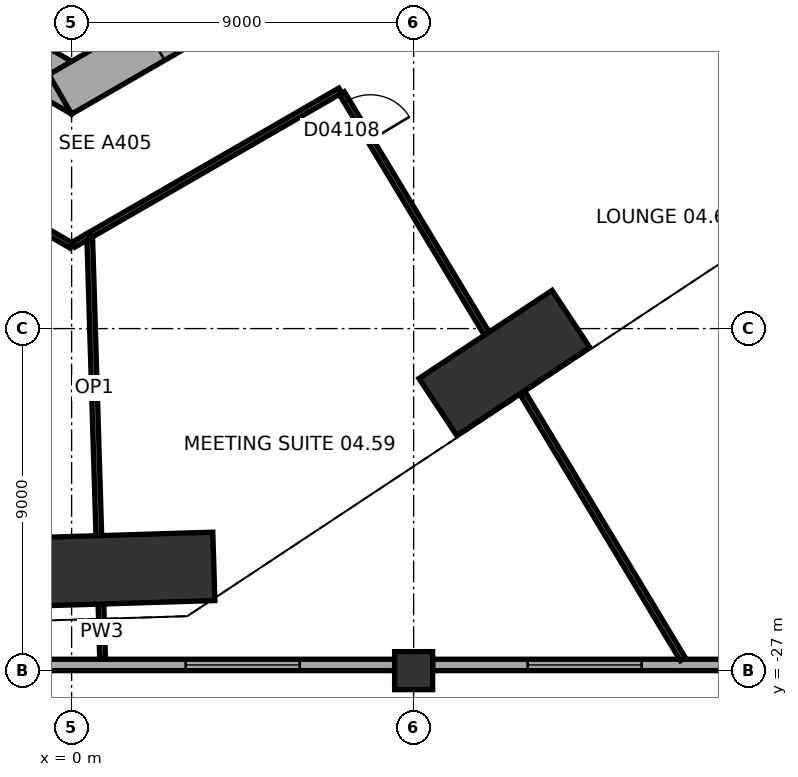
"""IFC4 building model, lengths in metres.
Left out: names, types, materials, properties, quantities, classifications, styles, units other than length and angle.
Written with IfcOpenShell. Run it as: python <this file> out.ifc"""

import sys

from ifc_helpers import new_model, si_unit, direction, frame, frame_2d, origin, origin_2d, place, context, subcontext, project, spatial, rectangle, extrude, element, fill, save


model = new_model("IFC4")
c1 = context("Model", 3, precision=1e-05, world=origin(), true_north=direction((0.0, 1.0)))
c2 = subcontext(c1, "Body", "Model", "MODEL_VIEW")
j1 = project(units=[si_unit("LENGTHUNIT", "METRE"), si_unit("PLANEANGLEUNIT", "RADIAN")], contexts=[c1])
p1 = place(None, origin())
s1 = spatial("IfcSite", under=j1, at=p1, CompositionType="ELEMENT")
p2 = place(p1, origin())
s2 = spatial("IfcBuilding", under=s1, at=p2, CompositionType="ELEMENT")
p3 = place(p2, frame((0.0, 0.0, 29.0)))
s3 = spatial("IfcBuildingStorey", under=s2, at=p3, CompositionType="ELEMENT", Elevation=29.0)
p4 = place(p3, frame((0.744, -24.348, 0.0), z_axis=(0.0, 0.0, 1.0), x_axis=(0.999533484231, 0.03054200224, 0.0)))
e1 = element("IfcColumn", 1, at=p4, inside=s3, PredefinedType="COLUMN", context=c2, shape_type="SweptSolid", body=[
    extrude(rectangle(XDim=6.0, YDim=1.8, at=origin_2d()), origin(), (0.0, 0.0, 1.0), 5.5),
])
p5 = place(p3, frame((11.389, -18.905, 0.0), z_axis=(0.0, 0.0, 1.0), x_axis=(0.833880042151, 0.551945717714, 0.0)))
e2 = element("IfcColumn", 2, at=p5, inside=s3, PredefinedType="COLUMN", context=c2, shape_type="SweptSolid", body=[
    extrude(rectangle(XDim=4.2, YDim=1.8, at=origin_2d()), origin(), (0.0, 0.0, 1.0), 5.5),
])
p6 = place(p3, frame((9.0, -27.0, 0.0), z_axis=(0.0, 0.0, 1.0), x_axis=(1.0, 0.0, 0.0)))
e3 = element("IfcColumn", 3, at=p6, inside=s3, PredefinedType="COLUMN", context=c2, shape_type="SweptSolid", body=[
    extrude(rectangle(XDim=1.0, YDim=1.0, at=origin_2d()), origin(), (0.0, 0.0, 1.0), 5.5),
])
p7 = place(p3, frame((-10.4, -5.658, 0.0), z_axis=(0.0, 0.0, 1.0), x_axis=(0.866021384402, -0.500006961711, 0.0)))
e4 = element("IfcWall", 4, at=p7, inside=s3, PredefinedType="SHEAR", context=c2, shape_type="SweptSolid", body=[
    extrude(rectangle(XDim=12.355, YDim=1.2, at=frame_2d((6.178, 0.0))), origin(), (0.0, 0.0, 1.0), 5.5),
])
p8 = place(p7, frame((6.378, 0.0, 0.0)))
e5 = element("IfcOpeningElement", 5, at=p8, cuts=e4, PredefinedType="OPENING", context=c2, shape_type="SweptSolid", body=[
    extrude(rectangle(XDim=1.5, YDim=2.1, at=frame_2d((0.75, 1.05))), frame((0.0, 0.61, 0.0), z_axis=(0.0, -1.0, 0.0), x_axis=(1.0, 0.0, 0.0)), (0.0, 0.0, 1.0), 1.22),
])
p9 = place(p7, frame((3.228, 0.0, 0.0)))
e6 = element("IfcOpeningElement", 6, at=p9, cuts=e4, PredefinedType="OPENING", context=c2, shape_type="SweptSolid", body=[
    extrude(rectangle(XDim=0.9, YDim=2.1, at=frame_2d((0.45, 1.05))), frame((0.0, 0.61, 0.0), z_axis=(0.0, -1.0, 0.0), x_axis=(1.0, 0.0, 0.0)), (0.0, 0.0, 1.0), 1.22),
])
p10 = place(p3, frame((-0.3, -11.836, 0.0), z_axis=(0.0, 0.0, 1.0), x_axis=(0.866021384402, 0.500006961711, 0.0)))
e7 = element("IfcWall", 7, at=p10, inside=s3, PredefinedType="SHEAR", context=c2, shape_type="SweptSolid", body=[
    extrude(rectangle(XDim=12.355, YDim=1.2, at=frame_2d((6.178, 0.0))), origin(), (0.0, 0.0, 1.0), 5.5),
])
p11 = place(p10, frame((2.828, 0.0, 0.0)))
e8 = element("IfcOpeningElement", 8, at=p11, cuts=e7, PredefinedType="OPENING", context=c2, shape_type="SweptSolid", body=[
    extrude(rectangle(XDim=0.9, YDim=2.1, at=frame_2d((0.45, 1.05))), frame((0.0, 0.61, 0.0), z_axis=(0.0, -1.0, 0.0), x_axis=(1.0, 0.0, 0.0)), (0.0, 0.0, 1.0), 1.22),
])
p12 = place(p10, frame((5.428, 0.0, 0.0)))
e9 = element("IfcOpeningElement", 9, at=p12, cuts=e7, PredefinedType="OPENING", context=c2, shape_type="SweptSolid", body=[
    extrude(rectangle(XDim=0.9, YDim=2.1, at=frame_2d((0.45, 1.05))), frame((0.0, 0.61, 0.0), z_axis=(0.0, -1.0, 0.0), x_axis=(1.0, 0.0, 0.0)), (0.0, 0.0, 1.0), 1.22),
])
p13 = place(p10, frame((7.928, 0.0, 0.0)))
e10 = element("IfcOpeningElement", 10, at=p13, cuts=e7, PredefinedType="OPENING", context=c2, shape_type="SweptSolid", body=[
    extrude(rectangle(XDim=1.1, YDim=2.1, at=frame_2d((0.55, 1.05))), frame((0.0, 0.61, 0.0), z_axis=(0.0, -1.0, 0.0), x_axis=(1.0, 0.0, 0.0)), (0.0, 0.0, 1.0), 1.22),
])
p14 = place(p3, frame((-8.5, -26.85, 0.0), z_axis=(0.0, 0.0, 1.0), x_axis=(1.0, 0.0, 0.0)))
e11 = element("IfcWall", 11, at=p14, inside=s3, PredefinedType="STANDARD", context=c2, shape_type="SweptSolid", body=[
    extrude(rectangle(XDim=17.0, YDim=0.3, at=frame_2d((8.5, 0.0))), origin(), (0.0, 0.0, 1.0), 3.95),
])
p15 = place(p14, frame((2.5, 0.0, 1.0)))
e12 = element("IfcOpeningElement", 12, at=p15, cuts=e11, PredefinedType="OPENING", context=c2, shape_type="SweptSolid", body=[
    extrude(rectangle(XDim=3.0, YDim=2.6, at=frame_2d((1.5, 1.3))), frame((0.0, 0.16, 0.0), z_axis=(0.0, -1.0, 0.0), x_axis=(1.0, 0.0, 0.0)), (0.0, 0.0, 1.0), 0.32),
])
p16 = place(p14, frame((11.5, 0.0, 1.0)))
e13 = element("IfcOpeningElement", 13, at=p16, cuts=e11, PredefinedType="OPENING", context=c2, shape_type="SweptSolid", body=[
    extrude(rectangle(XDim=3.0, YDim=2.6, at=frame_2d((1.5, 1.3))), frame((0.0, 0.16, 0.0), z_axis=(0.0, -1.0, 0.0), x_axis=(1.0, 0.0, 0.0)), (0.0, 0.0, 1.0), 0.32),
])
p17 = place(p3, frame((9.5, -26.85, 0.0), z_axis=(0.0, 0.0, 1.0), x_axis=(1.0, 0.0, 0.0)))
e14 = element("IfcWall", 14, at=p17, inside=s3, PredefinedType="STANDARD", context=c2, shape_type="SweptSolid", body=[
    extrude(rectangle(XDim=17.0, YDim=0.3, at=frame_2d((8.5, 0.0))), origin(), (0.0, 0.0, 1.0), 3.95),
])
p18 = place(p17, frame((2.5, 0.0, 1.0)))
e15 = element("IfcOpeningElement", 15, at=p18, cuts=e14, PredefinedType="OPENING", context=c2, shape_type="SweptSolid", body=[
    extrude(rectangle(XDim=3.0, YDim=2.6, at=frame_2d((1.5, 1.3))), frame((0.0, 0.16, 0.0), z_axis=(0.0, -1.0, 0.0), x_axis=(1.0, 0.0, 0.0)), (0.0, 0.0, 1.0), 0.32),
])
p19 = place(p17, frame((11.5, 0.0, 1.0)))
e16 = element("IfcOpeningElement", 16, at=p19, cuts=e14, PredefinedType="OPENING", context=c2, shape_type="SweptSolid", body=[
    extrude(rectangle(XDim=3.0, YDim=2.6, at=frame_2d((1.5, 1.3))), frame((0.0, 0.16, 0.0), z_axis=(0.0, -1.0, 0.0), x_axis=(1.0, 0.0, 0.0)), (0.0, 0.0, 1.0), 0.32),
])
p20 = place(p3, frame((0.771, -25.248, 0.0), z_axis=(0.0, 0.0, 1.0), x_axis=(0.030584206332, -0.99953219374, 0.0)))
e17 = element("IfcWall", 17, at=p20, inside=s3, PredefinedType="PARTITIONING", context=c2, shape_type="SweptSolid", body=[
    extrude(rectangle(XDim=1.453, YDim=0.15, at=frame_2d((0.727, 0.0))), origin(), (0.0, 0.0, 1.0), 5.15),
])
p21 = place(p3, frame((11.879, -19.719, 0.0), z_axis=(0.0, 0.0, 1.0), x_axis=(0.516054476578, -0.856555764212, 0.0)))
e18 = element("IfcWall", 18, at=p21, inside=s3, PredefinedType="PARTITIONING", context=c2, shape_type="SweptSolid", body=[
    extrude(rectangle(XDim=8.149, YDim=0.15, at=frame_2d((4.075, 0.0))), origin(), (0.0, 0.0, 1.0), 5.15),
])
p22 = place(p3, frame((10.924, -18.133, 0.0), z_axis=(0.0, 0.0, 1.0), x_axis=(-0.516035715917, 0.856567066784, 0.0)))
e19 = element("IfcWall", 19, at=p22, inside=s3, PredefinedType="PARTITIONING", context=c2, shape_type="SweptSolid", body=[
    extrude(rectangle(XDim=7.387, YDim=0.15, at=frame_2d((3.693, 0.0))), origin(), (0.0, 0.0, 1.0), 5.15),
])
p23 = place(p22, frame((5.937, 0.0, 0.0)))
e20 = element("IfcOpeningElement", 20, at=p23, cuts=e19, PredefinedType="OPENING", context=c2, shape_type="SweptSolid", body=[
    extrude(rectangle(XDim=1.2, YDim=2.1, at=frame_2d((0.6, 1.05))), frame((0.0, 0.085, 0.0), z_axis=(0.0, -1.0, 0.0), x_axis=(1.0, 0.0, 0.0)), (0.0, 0.0, 1.0), 0.17),
])
p24 = place(p3, frame((0.0, -15.82, 0.0), z_axis=(0.0, 0.0, 1.0), x_axis=(-0.866018019704, 0.500012789385, 0.0)))
e21 = element("IfcWall", 21, at=p24, inside=s3, PredefinedType="PARTITIONING", context=c2, shape_type="SweptSolid", body=[
    extrude(rectangle(XDim=7.327, YDim=0.15, at=frame_2d((3.664, 0.0))), origin(), (0.0, 0.0, 1.0), 5.15),
])
p25 = place(p24, frame((5.527, 0.0, 0.0)))
e22 = element("IfcOpeningElement", 22, at=p25, cuts=e21, PredefinedType="OPENING", context=c2, shape_type="SweptSolid", body=[
    extrude(rectangle(XDim=1.2, YDim=2.1, at=frame_2d((0.6, 1.05))), frame((0.0, 0.085, 0.0), z_axis=(0.0, -1.0, 0.0), x_axis=(1.0, 0.0, 0.0)), (0.0, 0.0, 1.0), 0.17),
])
p26 = place(p3, frame((0.479, -15.665, 0.0), z_axis=(0.0, 0.0, 1.0), x_axis=(0.030535907252, -0.999533670453, 0.0)))
e23 = element("IfcWall", 23, at=p26, inside=s3, PredefinedType="MOVABLE", context=c2, shape_type="SweptSolid", body=[
    extrude(rectangle(XDim=7.787, YDim=0.15, at=frame_2d((3.894, 0.0))), origin(), (0.0, 0.0, 1.0), 5.15),
])
p27 = place(p3, frame((0.475, -15.545, 0.0), z_axis=(0.0, 0.0, 1.0), x_axis=(0.866021168401, 0.500007335828, 0.0)))
e24 = element("IfcWall", 24, at=p27, inside=s3, PredefinedType="PARTITIONING", context=c2, shape_type="SweptSolid", body=[
    extrude(rectangle(XDim=7.616, YDim=0.15, at=frame_2d((3.808, 0.0))), origin(), (0.0, 0.0, 1.0), 5.15),
])
p28 = place(p3, frame((0.475, -15.545, 0.0), z_axis=(0.0, 0.0, 1.0), x_axis=(-0.865927594567, -0.50016937228, 0.0)))
e25 = element("IfcWall", 25, at=p28, inside=s3, PredefinedType="PARTITIONING", context=c2, shape_type="SweptSolid", body=[
    extrude(rectangle(XDim=0.489, YDim=0.15, at=frame_2d((0.244, 0.0))), origin(), (0.0, 0.0, 1.0), 5.15),
])
p29 = place(p16, origin())
e26 = element("IfcWindow", 26, at=p29, inside=s3, PartitioningType="SINGLE_PANEL", PredefinedType="WINDOW", context=c2, shape_type="SweptSolid", body=[
    extrude(rectangle(XDim=3.0, YDim=2.6, at=frame_2d((1.5, 1.3))), frame((0.0, 0.03, 0.0), z_axis=(0.0, -1.0, 0.0), x_axis=(1.0, 0.0, 0.0)), (0.0, 0.0, 1.0), 0.06),
])
fill(e13, e26)
p30 = place(p18, origin())
e27 = element("IfcWindow", 27, at=p30, inside=s3, PartitioningType="SINGLE_PANEL", PredefinedType="WINDOW", context=c2, shape_type="SweptSolid", body=[
    extrude(rectangle(XDim=3.0, YDim=2.6, at=frame_2d((1.5, 1.3))), frame((0.0, 0.03, 0.0), z_axis=(0.0, -1.0, 0.0), x_axis=(1.0, 0.0, 0.0)), (0.0, 0.0, 1.0), 0.06),
])
fill(e15, e27)
p31 = place(p23, origin())
e28 = element("IfcDoor", 28, at=p31, inside=s3, OperationType="SINGLE_SWING_LEFT", PredefinedType="DOOR", context=c2, shape_type="SweptSolid", body=[
    extrude(rectangle(XDim=1.2, YDim=2.1, at=frame_2d((0.6, 1.05))), frame((0.0, 0.025, 0.0), z_axis=(0.0, -1.0, 0.0), x_axis=(1.0, 0.0, 0.0)), (0.0, 0.0, 1.0), 0.05),
])
fill(e20, e28)
save(model, sys.argv[1])
